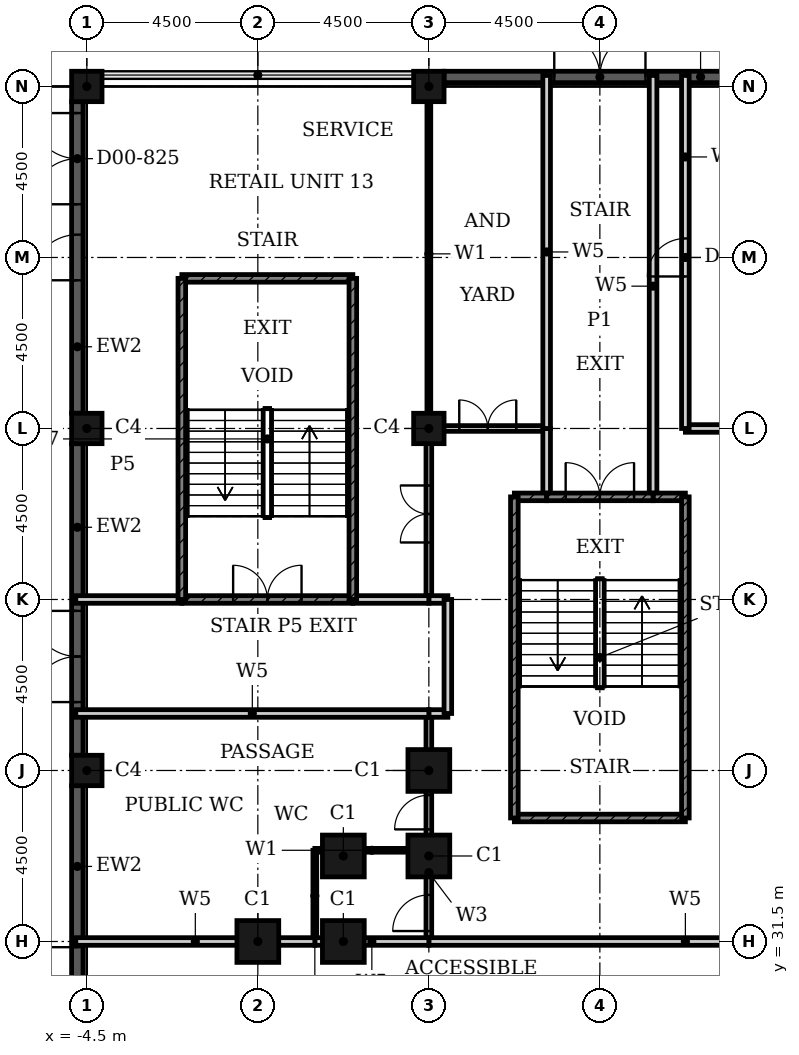
"""IFC4 building model, lengths in metres.
Left out: names, types, materials, properties, quantities, classifications, styles, units other than length and angle.
Written with IfcOpenShell. Run it as: python <this file> out.ifc"""

import sys

from ifc_helpers import new_model, si_unit, direction, frame, frame_2d, origin, origin_2d, place, context, subcontext, project, spatial, rectangle, hollow_rectangle, extrude, element, fill, save


model = new_model("IFC4")
c1 = context("Model", 3, precision=1e-05, world=origin(), true_north=direction((0.0, 1.0)))
c2 = subcontext(c1, "Body", "Model", "MODEL_VIEW")
j1 = project(units=[si_unit("LENGTHUNIT", "METRE"), si_unit("PLANEANGLEUNIT", "RADIAN")], contexts=[c1])
p1 = place(None, origin())
s1 = spatial("IfcSite", under=j1, at=p1, CompositionType="ELEMENT")
p2 = place(p1, origin())
s2 = spatial("IfcBuilding", under=s1, at=p2, CompositionType="ELEMENT")
p3 = place(p2, origin())
s3 = spatial("IfcBuildingStorey", under=s2, at=p3, CompositionType="ELEMENT", Elevation=0.0)
for number, where, z_axis, x_axis in (
    (1, (4.5, 36.0, 0.0), (0.0, 0.0, 1.0), (1.0, 0.0, 0.0)),
    (2, (4.5, 33.75, 0.0), (0.0, 0.0, 1.0), (1.0, 0.0, 0.0)),
    (3, (2.25, 33.75, 0.0), (0.0, 0.0, 1.0), (1.0, 0.0, 0.0)),
    (4, (2.25, 31.5, 0.0), (0.0, 0.0, 1.0), (1.0, 0.0, 0.0)),
    (5, (0.0, 31.5, 0.0), (0.0, 0.0, 1.0), (1.0, 0.0, 0.0)),
):
    element("IfcColumn", number, at=place(p3, frame(where, z_axis=z_axis, x_axis=x_axis)), inside=s3, PredefinedType="COLUMN", context=c2, shape_type="SweptSolid", body=[
        extrude(hollow_rectangle(XDim=1.1, YDim=1.1, WallThickness=0.036, at=origin_2d()), origin(), (0.0, 0.0, 1.0), 6.6),
    ])
for number, where, z_axis, x_axis in (
    (6, (-4.5, 36.0, 0.0), (0.0, 0.0, 1.0), (1.0, 0.0, 0.0)),
    (7, (-4.5, 45.0, 0.0), (0.0, 0.0, 1.0), (1.0, 0.0, 0.0)),
    (8, (-4.5, 54.0, 0.0), (0.0, 0.0, 1.0), (1.0, 0.0, 0.0)),
    (9, (4.5, 54.0, 0.0), (0.0, 0.0, 1.0), (1.0, 0.0, 0.0)),
    (10, (4.5, 45.0, 0.0), (0.0, 0.0, 1.0), (1.0, 0.0, 0.0)),
):
    element("IfcColumn", number, at=place(p3, frame(where, z_axis=z_axis, x_axis=x_axis)), inside=s3, PredefinedType="COLUMN", context=c2, shape_type="SweptSolid", body=[
        extrude(hollow_rectangle(XDim=0.8, YDim=0.8, WallThickness=0.025, at=origin_2d()), origin(), (0.0, 0.0, 1.0), 6.6),
    ])
p4 = place(p3, frame((4.9, 54.25, 0.0), z_axis=(0.0, 0.0, 1.0), x_axis=(1.0, 0.0, 0.0)))
e11 = element("IfcWall", 11, at=p4, inside=s3, PredefinedType="SOLIDWALL", context=c2, shape_type="SweptSolid", body=[
    extrude(rectangle(XDim=8.2, YDim=0.3, at=frame_2d((4.1, 0.0))), origin(), (0.0, 0.0, 1.0), 6.6),
])
p5 = place(p4, frame((2.9, 0.0, 0.0)))
e12 = element("IfcOpeningElement", 12, at=p5, cuts=e11, PredefinedType="OPENING", context=c2, shape_type="SweptSolid", body=[
    extrude(rectangle(XDim=2.4, YDim=2.4, at=frame_2d((1.2, 1.2))), frame((0.0, 0.16, 0.0), z_axis=(0.0, -1.0, 0.0), x_axis=(1.0, 0.0, 0.0)), (0.0, 0.0, 1.0), 0.32),
])
p6 = place(p3, frame((-4.75, 45.4, 0.0), z_axis=(0.0, 0.0, 1.0), x_axis=(0.0, 1.0, 0.0)))
e13 = element("IfcWall", 13, at=p6, inside=s3, PredefinedType="SOLIDWALL", context=c2, shape_type="SweptSolid", body=[
    extrude(rectangle(XDim=8.2, YDim=0.3, at=frame_2d((4.1, 0.0))), origin(), (0.0, 0.0, 1.0), 6.6),
])
p7 = place(p6, frame((3.5, 0.0, 0.0)))
e14 = element("IfcOpeningElement", 14, at=p7, cuts=e13, PredefinedType="OPENING", context=c2, shape_type="SweptSolid", body=[
    extrude(rectangle(XDim=1.2, YDim=2.4, at=frame_2d((0.6, 1.2))), frame((0.0, 0.16, 0.0), z_axis=(0.0, -1.0, 0.0), x_axis=(1.0, 0.0, 0.0)), (0.0, 0.0, 1.0), 0.32),
])
p8 = place(p6, frame((5.5, 0.0, 0.0)))
e15 = element("IfcOpeningElement", 15, at=p8, cuts=e13, PredefinedType="OPENING", context=c2, shape_type="SweptSolid", body=[
    extrude(rectangle(XDim=2.4, YDim=2.4, at=frame_2d((1.2, 1.2))), frame((0.0, 0.16, 0.0), z_axis=(0.0, -1.0, 0.0), x_axis=(1.0, 0.0, 0.0)), (0.0, 0.0, 1.0), 0.32),
])
p9 = place(p3, frame((-4.75, 36.4, 0.0), z_axis=(0.0, 0.0, 1.0), x_axis=(0.0, 1.0, 0.0)))
e16 = element("IfcWall", 16, at=p9, inside=s3, PredefinedType="SOLIDWALL", context=c2, shape_type="SweptSolid", body=[
    extrude(rectangle(XDim=8.2, YDim=0.3, at=frame_2d((4.1, 0.0))), origin(), (0.0, 0.0, 1.0), 6.6),
])
p10 = place(p9, frame((1.4, 0.0, 0.0)))
e17 = element("IfcOpeningElement", 17, at=p10, cuts=e16, PredefinedType="OPENING", context=c2, shape_type="SweptSolid", body=[
    extrude(rectangle(XDim=2.4, YDim=2.4, at=frame_2d((1.2, 1.2))), frame((0.0, 0.16, 0.0), z_axis=(0.0, -1.0, 0.0), x_axis=(1.0, 0.0, 0.0)), (0.0, 0.0, 1.0), 0.32),
])
p11 = place(p3, frame((-4.75, 27.4, 0.0), z_axis=(0.0, 0.0, 1.0), x_axis=(0.0, 1.0, 0.0)))
e18 = element("IfcWall", 18, at=p11, inside=s3, PredefinedType="SOLIDWALL", context=c2, shape_type="SweptSolid", body=[
    extrude(rectangle(XDim=8.2, YDim=0.3, at=frame_2d((4.1, 0.0))), origin(), (0.0, 0.0, 1.0), 6.6),
])
p12 = place(p11, frame((1.55, 0.0, 0.0)))
e19 = element("IfcOpeningElement", 19, at=p12, cuts=e18, PredefinedType="OPENING", context=c2, shape_type="SweptSolid", body=[
    extrude(rectangle(XDim=2.4, YDim=2.4, at=frame_2d((1.2, 1.2))), frame((0.0, 0.16, 0.0), z_axis=(0.0, -1.0, 0.0), x_axis=(1.0, 0.0, 0.0)), (0.0, 0.0, 1.0), 0.32),
])
p13 = place(p3, frame((4.5, 45.0, 0.0), z_axis=(0.0, 0.0, 1.0), x_axis=(1.0, 0.0, 0.0)))
e20 = element("IfcWall", 20, at=p13, inside=s3, PredefinedType="PARTITIONING", context=c2, shape_type="SweptSolid", body=[
    extrude(rectangle(XDim=3.1, YDim=0.15, at=frame_2d((1.55, 0.0))), origin(), (0.0, 0.0, 1.0), 6.25),
])
p14 = place(p13, frame((0.8, 0.0, 0.0)))
e21 = element("IfcOpeningElement", 21, at=p14, cuts=e20, PredefinedType="OPENING", context=c2, shape_type="SweptSolid", body=[
    extrude(rectangle(XDim=1.5, YDim=2.4, at=frame_2d((0.75, 1.2))), frame((0.0, 0.085, 0.0), z_axis=(0.0, -1.0, 0.0), x_axis=(1.0, 0.0, 0.0)), (0.0, 0.0, 1.0), 0.17),
])
p15 = place(p3, frame((4.5, 31.5, 0.0), z_axis=(0.0, 0.0, 1.0), x_axis=(0.0, 1.0, 0.0)))
e22 = element("IfcWall", 22, at=p15, inside=s3, PredefinedType="PARTITIONING", context=c2, shape_type="SweptSolid", body=[
    extrude(rectangle(XDim=2.4, YDim=0.15, at=frame_2d((1.2, 0.0))), origin(), (0.0, 0.0, 1.0), 6.25),
])
p16 = place(p15, frame((0.275, 0.0, 0.0)))
e23 = element("IfcOpeningElement", 23, at=p16, cuts=e22, PredefinedType="OPENING", context=c2, shape_type="SweptSolid", body=[
    extrude(rectangle(XDim=0.95, YDim=2.1, at=frame_2d((0.475, 1.05))), frame((0.0, 0.085, 0.0), z_axis=(0.0, -1.0, 0.0), x_axis=(1.0, 0.0, 0.0)), (0.0, 0.0, 1.0), 0.17),
])
p17 = place(p3, frame((4.5, 33.9, 0.0), z_axis=(0.0, 0.0, 1.0), x_axis=(0.0, 1.0, 0.0)))
e24 = element("IfcWall", 24, at=p17, inside=s3, PredefinedType="PARTITIONING", context=c2, shape_type="SweptSolid", body=[
    extrude(rectangle(XDim=3.6, YDim=0.15, at=frame_2d((1.8, 0.0))), origin(), (0.0, 0.0, 1.0), 6.25),
])
p18 = place(p17, frame((0.55, 0.0, 0.0)))
e25 = element("IfcOpeningElement", 25, at=p18, cuts=e24, PredefinedType="OPENING", context=c2, shape_type="SweptSolid", body=[
    extrude(rectangle(XDim=0.9, YDim=2.1, at=frame_2d((0.45, 1.05))), frame((0.0, 0.085, 0.0), z_axis=(0.0, -1.0, 0.0), x_axis=(1.0, 0.0, 0.0)), (0.0, 0.0, 1.0), 0.17),
])
p19 = place(p3, frame((4.5, 40.5, 0.0), z_axis=(0.0, 0.0, 1.0), x_axis=(0.0, 1.0, 0.0)))
e26 = element("IfcWall", 26, at=p19, inside=s3, PredefinedType="PARTITIONING", context=c2, shape_type="SweptSolid", body=[
    extrude(rectangle(XDim=4.5, YDim=0.15, at=frame_2d((2.25, 0.0))), origin(), (0.0, 0.0, 1.0), 6.25),
])
p20 = place(p19, frame((1.5, 0.0, 0.0)))
e27 = element("IfcOpeningElement", 27, at=p20, cuts=e26, PredefinedType="OPENING", context=c2, shape_type="SweptSolid", body=[
    extrude(rectangle(XDim=1.5, YDim=2.4, at=frame_2d((0.75, 1.2))), frame((0.0, 0.085, 0.0), z_axis=(0.0, -1.0, 0.0), x_axis=(1.0, 0.0, 0.0)), (0.0, 0.0, 1.0), 0.17),
])
p21 = place(p3, frame((1.5, 33.9, 0.0), z_axis=(0.0, 0.0, 1.0), x_axis=(1.0, 0.0, 0.0)))
e28 = element("IfcWall", 28, at=p21, inside=s3, PredefinedType="PARTITIONING", context=c2, shape_type="SweptSolid", body=[
    extrude(rectangle(XDim=3.0, YDim=0.1, at=frame_2d((1.5, 0.0))), origin(), (0.0, 0.0, 1.0), 6.25),
])
p22 = place(p3, frame((1.5, 31.5, 0.0), z_axis=(0.0, 0.0, 1.0), x_axis=(0.0, 1.0, 0.0)))
e29 = element("IfcWall", 29, at=p22, inside=s3, PredefinedType="PARTITIONING", context=c2, shape_type="SweptSolid", body=[
    extrude(rectangle(XDim=2.4, YDim=0.1, at=frame_2d((1.2, 0.0))), origin(), (0.0, 0.0, 1.0), 6.25),
])
p23 = place(p3, frame((4.5, 45.0, 0.0), z_axis=(0.0, 0.0, 1.0), x_axis=(0.0, 1.0, 0.0)))
e30 = element("IfcWall", 30, at=p23, inside=s3, PredefinedType="PARTITIONING", context=c2, shape_type="SweptSolid", body=[
    extrude(rectangle(XDim=9.19, YDim=0.1, at=frame_2d((4.595, 0.0))), origin(), (0.0, 0.0, 1.0), 6.25),
])
p24 = place(p3, frame((4.5, 31.5, 0.0), z_axis=(0.0, 0.0, 1.0), x_axis=(1.0, 0.0, 0.0)))
e31 = element("IfcWall", 31, at=p24, inside=s3, PredefinedType="PARTITIONING", context=c2, shape_type="SweptSolid", body=[
    extrude(rectangle(XDim=13.5, YDim=0.2, at=frame_2d((6.75, 0.0))), origin(), (0.0, 0.0, 1.0), 6.25),
])
p25 = place(p3, frame((1.5, 31.5, 0.0), z_axis=(0.0, 0.0, 1.0), x_axis=(1.0, 0.0, 0.0)))
e32 = element("IfcWall", 32, at=p25, inside=s3, PredefinedType="PARTITIONING", context=c2, shape_type="SweptSolid", body=[
    extrude(rectangle(XDim=3.0, YDim=0.2, at=frame_2d((1.5, 0.0))), origin(), (0.0, 0.0, 1.0), 6.25),
])
p26 = place(p3, frame((-4.79, 31.5, 0.0), z_axis=(0.0, 0.0, 1.0), x_axis=(1.0, 0.0, 0.0)))
e33 = element("IfcWall", 33, at=p26, inside=s3, PredefinedType="PARTITIONING", context=c2, shape_type="SweptSolid", body=[
    extrude(rectangle(XDim=6.29, YDim=0.2, at=frame_2d((3.145, 0.0))), origin(), (0.0, 0.0, 1.0), 6.25),
])
p27 = place(p3, frame((4.5, 37.5, 0.0), z_axis=(0.0, 0.0, 1.0), x_axis=(1.0, 0.0, 0.0)))
e34 = element("IfcWall", 34, at=p27, inside=s3, PredefinedType="PARTITIONING", context=c2, shape_type="SweptSolid", body=[
    extrude(rectangle(XDim=0.5, YDim=0.2, at=frame_2d((0.25, 0.0))), origin(), (0.0, 0.0, 1.0), 6.25),
])
p28 = place(p3, frame((-4.79, 37.5, 0.0), z_axis=(0.0, 0.0, 1.0), x_axis=(1.0, 0.0, 0.0)))
e35 = element("IfcWall", 35, at=p28, inside=s3, PredefinedType="PARTITIONING", context=c2, shape_type="SweptSolid", body=[
    extrude(rectangle(XDim=9.29, YDim=0.2, at=frame_2d((4.645, 0.0))), origin(), (0.0, 0.0, 1.0), 6.25),
])
p29 = place(p3, frame((4.5, 40.5, 0.0), z_axis=(0.0, 0.0, 1.0), x_axis=(1.0, 0.0, 0.0)))
e36 = element("IfcWall", 36, at=p29, inside=s3, PredefinedType="PARTITIONING", context=c2, shape_type="SweptSolid", body=[
    extrude(rectangle(XDim=0.5, YDim=0.2, at=frame_2d((0.25, 0.0))), origin(), (0.0, 0.0, 1.0), 6.25),
])
p30 = place(p3, frame((-4.79, 40.5, 0.0), z_axis=(0.0, 0.0, 1.0), x_axis=(1.0, 0.0, 0.0)))
e37 = element("IfcWall", 37, at=p30, inside=s3, PredefinedType="PARTITIONING", context=c2, shape_type="SweptSolid", body=[
    extrude(rectangle(XDim=2.79, YDim=0.2, at=frame_2d((1.395, 0.0))), origin(), (0.0, 0.0, 1.0), 6.25),
])
p31 = place(p3, frame((2.5, 40.5, 0.0), z_axis=(0.0, 0.0, 1.0), x_axis=(1.0, 0.0, 0.0)))
e38 = element("IfcWall", 38, at=p31, inside=s3, PredefinedType="PARTITIONING", context=c2, shape_type="SweptSolid", body=[
    extrude(rectangle(XDim=2.0, YDim=0.2, at=frame_2d((1.0, 0.0))), origin(), (0.0, 0.0, 1.0), 6.25),
])
p32 = place(p3, frame((11.25, 45.0, 0.0), z_axis=(0.0, 0.0, 1.0), x_axis=(1.0, 0.0, 0.0)))
e39 = element("IfcWall", 39, at=p32, inside=s3, PredefinedType="PARTITIONING", context=c2, shape_type="SweptSolid", body=[
    extrude(rectangle(XDim=6.75, YDim=0.2, at=frame_2d((3.375, 0.0))), origin(), (0.0, 0.0, 1.0), 6.25),
])
p33 = place(p3, frame((10.4, 43.2, 0.0), z_axis=(0.0, 0.0, 1.0), x_axis=(0.0, 1.0, 0.0)))
e40 = element("IfcWall", 40, at=p33, inside=s3, PredefinedType="PARTITIONING", context=c2, shape_type="SweptSolid", body=[
    extrude(rectangle(XDim=11.09, YDim=0.2, at=frame_2d((5.545, 0.0))), origin(), (0.0, 0.0, 1.0), 6.25),
])
p34 = place(p3, frame((11.25, 45.0, 0.0), z_axis=(0.0, 0.0, 1.0), x_axis=(0.0, 1.0, 0.0)))
e41 = element("IfcWall", 41, at=p34, inside=s3, PredefinedType="PARTITIONING", context=c2, shape_type="SweptSolid", body=[
    extrude(rectangle(XDim=9.29, YDim=0.2, at=frame_2d((4.645, 0.0))), origin(), (0.0, 0.0, 1.0), 6.25),
])
p35 = place(p34, frame((4.0, 0.0, 0.0)))
e42 = element("IfcOpeningElement", 42, at=p35, cuts=e41, PredefinedType="OPENING", context=c2, shape_type="SweptSolid", body=[
    extrude(rectangle(XDim=1.0, YDim=2.1, at=frame_2d((0.5, 1.05))), frame((0.0, 0.11, 0.0), z_axis=(0.0, -1.0, 0.0), x_axis=(1.0, 0.0, 0.0)), (0.0, 0.0, 1.0), 0.22),
])
p36 = place(p3, frame((5.0, 37.5, 0.0), z_axis=(0.0, 0.0, 1.0), x_axis=(0.0, 1.0, 0.0)))
e43 = element("IfcWall", 43, at=p36, inside=s3, PredefinedType="PARTITIONING", context=c2, shape_type="SweptSolid", body=[
    extrude(rectangle(XDim=3.0, YDim=0.2, at=frame_2d((1.5, 0.0))), origin(), (0.0, 0.0, 1.0), 6.25),
])
p37 = place(p3, frame((7.6, 43.2, 0.0), z_axis=(0.0, 0.0, 1.0), x_axis=(0.0, 1.0, 0.0)))
e44 = element("IfcWall", 44, at=p37, inside=s3, PredefinedType="PARTITIONING", context=c2, shape_type="SweptSolid", body=[
    extrude(rectangle(XDim=1.8, YDim=0.2, at=frame_2d((0.9, 0.0))), origin(), (0.0, 0.0, 1.0), 6.25),
])
p38 = place(p3, frame((7.6, 45.0, 0.0), z_axis=(0.0, 0.0, 1.0), x_axis=(0.0, 1.0, 0.0)))
e45 = element("IfcWall", 45, at=p38, inside=s3, PredefinedType="PARTITIONING", context=c2, shape_type="SweptSolid", body=[
    extrude(rectangle(XDim=9.29, YDim=0.2, at=frame_2d((4.645, 0.0))), origin(), (0.0, 0.0, 1.0), 6.25),
])
p39 = place(p3, frame((6.75, 34.75, 0.0), z_axis=(0.0, 0.0, 1.0), x_axis=(1.0, 0.0, 0.0)))
e46 = element("IfcWall", 46, at=p39, inside=s3, PredefinedType="SHEAR", context=c2, shape_type="SweptSolid", body=[
    extrude(rectangle(XDim=4.5, YDim=0.2, at=frame_2d((2.25, 0.0))), origin(), (0.0, 0.0, 1.0), 6.25),
])
p40 = place(p3, frame((-2.0, 40.5, 0.0), z_axis=(0.0, 0.0, 1.0), x_axis=(1.0, 0.0, 0.0)))
e47 = element("IfcWall", 47, at=p40, inside=s3, PredefinedType="SHEAR", context=c2, shape_type="SweptSolid", body=[
    extrude(rectangle(XDim=4.5, YDim=0.2, at=frame_2d((2.25, 0.0))), origin(), (0.0, 0.0, 1.0), 6.25),
])
p41 = place(p40, frame((1.35, 0.0, 0.0)))
e48 = element("IfcOpeningElement", 48, at=p41, cuts=e47, PredefinedType="OPENING", context=c2, shape_type="SweptSolid", body=[
    extrude(rectangle(XDim=1.8, YDim=2.1, at=frame_2d((0.9, 1.05))), frame((0.0, 0.11, 0.0), z_axis=(0.0, -1.0, 0.0), x_axis=(1.0, 0.0, 0.0)), (0.0, 0.0, 1.0), 0.22),
])
for number, where, z_axis, x_axis in (
    (49, (6.75, 43.2, 0.0), (0.0, 0.0, 1.0), (1.0, 0.0, 0.0)),
    (50, (10.4, 43.2, 0.0), (0.0, 0.0, 1.0), (1.0, 0.0, 0.0)),
):
    element("IfcWall", number, at=place(p3, frame(where, z_axis=z_axis, x_axis=x_axis)), inside=s3, PredefinedType="SHEAR", context=c2, shape_type="SweptSolid", body=[
        extrude(rectangle(XDim=0.85, YDim=0.2, at=frame_2d((0.425, 0.0))), origin(), (0.0, 0.0, 1.0), 6.25),
    ])
p42 = place(p3, frame((7.6, 43.2, 0.0), z_axis=(0.0, 0.0, 1.0), x_axis=(1.0, 0.0, 0.0)))
e51 = element("IfcWall", 51, at=p42, inside=s3, PredefinedType="SHEAR", context=c2, shape_type="SweptSolid", body=[
    extrude(rectangle(XDim=2.8, YDim=0.2, at=frame_2d((1.4, 0.0))), origin(), (0.0, 0.0, 1.0), 6.25),
])
p43 = place(p42, frame((0.5, 0.0, 0.0)))
e52 = element("IfcOpeningElement", 52, at=p43, cuts=e51, PredefinedType="OPENING", context=c2, shape_type="SweptSolid", body=[
    extrude(rectangle(XDim=1.8, YDim=2.1, at=frame_2d((0.9, 1.05))), frame((0.0, 0.11, 0.0), z_axis=(0.0, -1.0, 0.0), x_axis=(1.0, 0.0, 0.0)), (0.0, 0.0, 1.0), 0.22),
])
p44 = place(p3, frame((-2.0, 48.95, 0.0), z_axis=(0.0, 0.0, 1.0), x_axis=(1.0, 0.0, 0.0)))
e53 = element("IfcWall", 53, at=p44, inside=s3, PredefinedType="SHEAR", context=c2, shape_type="SweptSolid", body=[
    extrude(rectangle(XDim=4.5, YDim=0.2, at=frame_2d((2.25, 0.0))), origin(), (0.0, 0.0, 1.0), 6.25),
])
for number, where, z_axis, x_axis in (
    (54, (-2.0, 40.5, 0.0), (0.0, 0.0, 1.0), (0.0, 1.0, 0.0)),
    (55, (11.25, 34.75, 0.0), (0.0, 0.0, 1.0), (0.0, 1.0, 0.0)),
    (56, (2.5, 40.5, 0.0), (0.0, 0.0, 1.0), (0.0, 1.0, 0.0)),
    (57, (6.75, 34.75, 0.0), (0.0, 0.0, 1.0), (0.0, 1.0, 0.0)),
):
    element("IfcWall", number, at=place(p3, frame(where, z_axis=z_axis, x_axis=x_axis)), inside=s3, PredefinedType="SHEAR", context=c2, shape_type="SweptSolid", body=[
        extrude(rectangle(XDim=8.45, YDim=0.2, at=frame_2d((4.225, 0.0))), origin(), (0.0, 0.0, 1.0), 6.25),
    ])
p45 = place(p5, origin())
e58 = element("IfcDoor", 58, at=p45, inside=s3, OperationType="DOUBLE_DOOR_SINGLE_SWING", PredefinedType="DOOR", context=c2, shape_type="SweptSolid", body=[
    extrude(rectangle(XDim=2.4, YDim=2.4, at=frame_2d((1.2, 1.2))), frame((0.0, 0.025, 0.0), z_axis=(0.0, -1.0, 0.0), x_axis=(1.0, 0.0, 0.0)), (0.0, 0.0, 1.0), 0.05),
])
fill(e12, e58)
p46 = place(p7, origin())
e59 = element("IfcDoor", 59, at=p46, inside=s3, OperationType="SINGLE_SWING_LEFT", PredefinedType="DOOR", context=c2, shape_type="SweptSolid", body=[
    extrude(rectangle(XDim=1.2, YDim=2.4, at=frame_2d((0.6, 1.2))), frame((0.0, 0.025, 0.0), z_axis=(0.0, -1.0, 0.0), x_axis=(1.0, 0.0, 0.0)), (0.0, 0.0, 1.0), 0.05),
])
fill(e14, e59)
p47 = place(p8, origin())
e60 = element("IfcDoor", 60, at=p47, inside=s3, OperationType="DOUBLE_DOOR_SINGLE_SWING", PredefinedType="DOOR", context=c2, shape_type="SweptSolid", body=[
    extrude(rectangle(XDim=2.4, YDim=2.4, at=frame_2d((1.2, 1.2))), frame((0.0, 0.025, 0.0), z_axis=(0.0, -1.0, 0.0), x_axis=(1.0, 0.0, 0.0)), (0.0, 0.0, 1.0), 0.05),
])
fill(e15, e60)
p48 = place(p10, origin())
e61 = element("IfcDoor", 61, at=p48, inside=s3, OperationType="DOUBLE_DOOR_SINGLE_SWING", PredefinedType="DOOR", context=c2, shape_type="SweptSolid", body=[
    extrude(rectangle(XDim=2.4, YDim=2.4, at=frame_2d((1.2, 1.2))), frame((0.0, 0.025, 0.0), z_axis=(0.0, -1.0, 0.0), x_axis=(1.0, 0.0, 0.0)), (0.0, 0.0, 1.0), 0.05),
])
fill(e17, e61)
p49 = place(p12, origin())
e62 = element("IfcDoor", 62, at=p49, inside=s3, OperationType="DOUBLE_DOOR_SINGLE_SWING", PredefinedType="DOOR", context=c2, shape_type="SweptSolid", body=[
    extrude(rectangle(XDim=2.4, YDim=2.4, at=frame_2d((1.2, 1.2))), frame((0.0, 0.025, 0.0), z_axis=(0.0, -1.0, 0.0), x_axis=(1.0, 0.0, 0.0)), (0.0, 0.0, 1.0), 0.05),
])
fill(e19, e62)
p50 = place(p43, origin())
e63 = element("IfcDoor", 63, at=p50, inside=s3, OperationType="DOUBLE_DOOR_SINGLE_SWING", PredefinedType="DOOR", context=c2, shape_type="SweptSolid", body=[
    extrude(rectangle(XDim=1.8, YDim=2.1, at=frame_2d((0.9, 1.05))), frame((0.0, 0.025, 0.0), z_axis=(0.0, -1.0, 0.0), x_axis=(1.0, 0.0, 0.0)), (0.0, 0.0, 1.0), 0.05),
])
fill(e52, e63)
p51 = place(p41, origin())
e64 = element("IfcDoor", 64, at=p51, inside=s3, OperationType="DOUBLE_DOOR_SINGLE_SWING", PredefinedType="DOOR", context=c2, shape_type="SweptSolid", body=[
    extrude(rectangle(XDim=1.8, YDim=2.1, at=frame_2d((0.9, 1.05))), frame((0.0, 0.025, 0.0), z_axis=(0.0, -1.0, 0.0), x_axis=(1.0, 0.0, 0.0)), (0.0, 0.0, 1.0), 0.05),
])
fill(e48, e64)
p52 = place(p16, origin())
e65 = element("IfcDoor", 65, at=p52, inside=s3, OperationType="SINGLE_SWING_LEFT", PredefinedType="DOOR", context=c2, shape_type="SweptSolid", body=[
    extrude(rectangle(XDim=0.95, YDim=2.1, at=frame_2d((0.475, 1.05))), frame((0.0, 0.025, 0.0), z_axis=(0.0, -1.0, 0.0), x_axis=(1.0, 0.0, 0.0)), (0.0, 0.0, 1.0), 0.05),
])
fill(e23, e65)
p53 = place(p18, origin())
e66 = element("IfcDoor", 66, at=p53, inside=s3, OperationType="SINGLE_SWING_LEFT", PredefinedType="DOOR", context=c2, shape_type="SweptSolid", body=[
    extrude(rectangle(XDim=0.9, YDim=2.1, at=frame_2d((0.45, 1.05))), frame((0.0, 0.025, 0.0), z_axis=(0.0, -1.0, 0.0), x_axis=(1.0, 0.0, 0.0)), (0.0, 0.0, 1.0), 0.05),
])
fill(e25, e66)
p54 = place(p20, origin())
e67 = element("IfcDoor", 67, at=p54, inside=s3, OperationType="DOUBLE_DOOR_SINGLE_SWING", PredefinedType="DOOR", context=c2, shape_type="SweptSolid", body=[
    extrude(rectangle(XDim=1.5, YDim=2.4, at=frame_2d((0.75, 1.2))), frame((0.0, 0.025, 0.0), z_axis=(0.0, -1.0, 0.0), x_axis=(1.0, 0.0, 0.0)), (0.0, 0.0, 1.0), 0.05),
])
fill(e27, e67)
p55 = place(p14, origin())
e68 = element("IfcDoor", 68, at=p55, inside=s3, OperationType="DOUBLE_DOOR_SINGLE_SWING", PredefinedType="DOOR", context=c2, shape_type="SweptSolid", body=[
    extrude(rectangle(XDim=1.5, YDim=2.4, at=frame_2d((0.75, 1.2))), frame((0.0, 0.025, 0.0), z_axis=(0.0, -1.0, 0.0), x_axis=(1.0, 0.0, 0.0)), (0.0, 0.0, 1.0), 0.05),
])
fill(e21, e68)
p56 = place(p35, origin())
e69 = element("IfcDoor", 69, at=p56, inside=s3, OperationType="SINGLE_SWING_LEFT", PredefinedType="DOOR", context=c2, shape_type="SweptSolid", body=[
    extrude(rectangle(XDim=1.0, YDim=2.1, at=frame_2d((0.5, 1.05))), frame((0.0, 0.025, 0.0), z_axis=(0.0, -1.0, 0.0), x_axis=(1.0, 0.0, 0.0)), (0.0, 0.0, 1.0), 0.05),
])
fill(e42, e69)
save(model, sys.argv[1])
